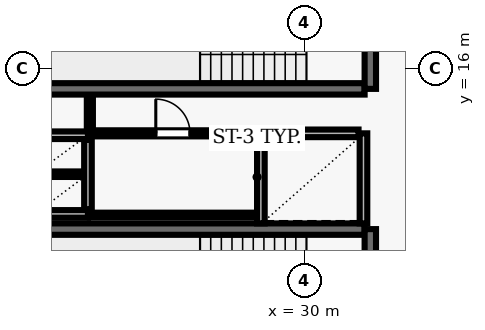
"""IFC4 building model, lengths in metres.
Left out: names, types, materials, properties, quantities, classifications, styles, units other than length and angle.
Written with IfcOpenShell. Run it as: python <this file> out.ifc"""

import sys

from ifc_helpers import new_model, si_unit, direction, frame, frame_2d, origin, place, context, subcontext, project, spatial, rectangle, extrude, element, fill, save


model = new_model("IFC4")
c1 = context("Model", 3, precision=1e-05, world=origin(), true_north=direction((0.0, 1.0)))
c2 = subcontext(c1, "Body", "Model", "MODEL_VIEW")
j1 = project(units=[si_unit("LENGTHUNIT", "METRE"), si_unit("PLANEANGLEUNIT", "RADIAN")], contexts=[c1])
p1 = place(None, origin())
s1 = spatial("IfcSite", under=j1, at=p1, CompositionType="ELEMENT")
p2 = place(p1, origin())
s2 = spatial("IfcBuilding", under=s1, at=p2, CompositionType="ELEMENT")
p3 = place(p2, frame((0.0, 0.0, 58.3)))
s3 = spatial("IfcBuildingStorey", under=s2, at=p3, CompositionType="ELEMENT", Elevation=58.3)
p4 = place(p3, frame((23.22, 15.47, 0.0), z_axis=(0.0, 0.0, 1.0), x_axis=(1.0, 0.0, 0.0)))
e1 = element("IfcWall", 1, at=p4, inside=s3, PredefinedType="SHEAR", context=c2, shape_type="SweptSolid", body=[
    extrude(rectangle(XDim=8.36, YDim=0.3, at=frame_2d((4.18, 0.0))), origin(), (0.0, 0.0, 1.0), 3.69),
])
p5 = place(p3, frame((31.73, 15.47, 0.0), z_axis=(0.0, 0.0, 1.0), x_axis=(0.0, 1.0, 0.0)))
e2 = element("IfcWall", 2, at=p5, inside=s3, PredefinedType="SHEAR", context=c2, shape_type="SweptSolid", body=[
    extrude(rectangle(XDim=3.51, YDim=0.3, at=frame_2d((1.755, 0.0))), origin(), (0.0, 0.0, 1.0), 3.69),
])
p6 = place(p5, frame((1.18, 0.0, 0.0)))
e3 = element("IfcOpeningElement", 3, at=p6, cuts=e2, PredefinedType="OPENING", context=c2, shape_type="SweptSolid", body=[
    extrude(rectangle(XDim=1.15, YDim=2.15, at=frame_2d((0.575, 1.075))), frame((0.0, 0.16, 0.0), z_axis=(0.0, -1.0, 0.0), x_axis=(1.0, 0.0, 0.0)), (0.0, 0.0, 1.0), 0.32),
])
p7 = place(p3, frame((31.58, 11.78, 0.0), z_axis=(0.0, 0.0, 1.0), x_axis=(-1.0, 0.0, 0.0)))
e4 = element("IfcWall", 4, at=p7, inside=s3, PredefinedType="SHEAR", context=c2, shape_type="SweptSolid", body=[
    extrude(rectangle(XDim=8.36, YDim=0.3, at=frame_2d((4.18, 0.0))), origin(), (0.0, 0.0, 1.0), 3.69),
])
p8 = place(p3, frame((31.73, 8.27, 0.0), z_axis=(0.0, 0.0, 1.0), x_axis=(0.0, 1.0, 0.0)))
e5 = element("IfcWall", 5, at=p8, inside=s3, PredefinedType="SHEAR", context=c2, shape_type="SweptSolid", body=[
    extrude(rectangle(XDim=3.51, YDim=0.3, at=frame_2d((1.755, 0.0))), origin(), (0.0, 0.0, 1.0), 3.69),
])
p9 = place(p8, frame((1.18, 0.0, 0.0)))
e6 = element("IfcOpeningElement", 6, at=p9, cuts=e5, PredefinedType="OPENING", context=c2, shape_type="SweptSolid", body=[
    extrude(rectangle(XDim=1.15, YDim=2.15, at=frame_2d((0.575, 1.075))), frame((0.0, 0.16, 0.0), z_axis=(0.0, -1.0, 0.0), x_axis=(1.0, 0.0, 0.0)), (0.0, 0.0, 1.0), 0.32),
])
for number, where, z_axis, x_axis in (
    (7, (28.85, 14.3, 0.0), (0.0, 0.0, 1.0), (0.0, -1.0, 0.0)),
    (8, (31.55, 11.93, 0.0), (0.0, 0.0, 1.0), (0.0, 1.0, 0.0)),
):
    element("IfcWall", number, at=place(p3, frame(where, z_axis=z_axis, x_axis=x_axis)), inside=s3, PredefinedType="SOLIDWALL", context=c2, shape_type="SweptSolid", body=[
        extrude(rectangle(XDim=2.37, YDim=0.2, at=frame_2d((1.185, 0.0))), origin(), (0.0, 0.0, 1.0), 3.69),
    ])
p10 = place(p3, frame((31.42, 14.3, 0.0), z_axis=(0.0, 0.0, 1.0), x_axis=(-1.0, 0.0, 0.0)))
e9 = element("IfcWall", 9, at=p10, inside=s3, PredefinedType="SOLIDWALL", context=c2, shape_type="SweptSolid", body=[
    extrude(rectangle(XDim=2.44, YDim=0.2, at=frame_2d((1.22, 0.0))), origin(), (0.0, 0.0, 1.0), 3.69),
])
for number, where, z_axis, x_axis in (
    (10, (22.9, 14.25, 0.0), (0.0, 0.0, 1.0), (1.0, 0.0, 0.0)),
    (11, (22.9, 12.18, 0.0), (0.0, 0.0, 1.0), (1.0, 0.0, 0.0)),
):
    element("IfcWall", number, at=place(p3, frame(where, z_axis=z_axis, x_axis=x_axis)), inside=s3, PredefinedType="SOLIDWALL", context=c2, shape_type="SweptSolid", body=[
        extrude(rectangle(XDim=1.4, YDim=0.2, at=frame_2d((0.7, 0.0))), origin(), (0.0, 0.0, 1.0), 3.69),
    ])
p11 = place(p3, frame((24.3, 12.3, 0.0), z_axis=(0.0, 0.0, 1.0), x_axis=(0.0, 1.0, 0.0)))
e12 = element("IfcWall", 12, at=p11, inside=s3, PredefinedType="SOLIDWALL", context=c2, shape_type="SweptSolid", body=[
    extrude(rectangle(XDim=1.83, YDim=0.2, at=frame_2d((0.915, 0.0))), origin(), (0.0, 0.0, 1.0), 3.69),
])
p12 = place(p3, frame((23.01, 13.225, 0.0), z_axis=(0.0, 0.0, 1.0), x_axis=(1.0, 0.0, 0.0)))
e13 = element("IfcWall", 13, at=p12, inside=s3, PredefinedType="PARTITIONING", context=c2, shape_type="SweptSolid", body=[
    extrude(rectangle(XDim=1.18, YDim=0.145, at=frame_2d((0.59, 0.0))), origin(), (0.0, 0.0, 1.0), 3.69),
])
p13 = place(p3, frame((24.35, 12.15, 0.0), z_axis=(0.0, 0.0, 1.0), x_axis=(1.0, 0.0, 0.0)))
e14 = element("IfcWall", 14, at=p13, inside=s3, PredefinedType="PARTITIONING", context=c2, shape_type="SweptSolid", body=[
    extrude(rectangle(XDim=4.37, YDim=0.125, at=frame_2d((2.185, 0.0))), origin(), (0.0, 0.0, 1.0), 3.69),
])
p14 = place(p3, frame((24.35, 14.3, 0.0), z_axis=(0.0, 0.0, 1.0), x_axis=(1.0, 0.0, 0.0)))
e15 = element("IfcWall", 15, at=p14, inside=s3, PredefinedType="PARTITIONING", context=c2, shape_type="SweptSolid", body=[
    extrude(rectangle(XDim=4.37, YDim=0.16, at=frame_2d((2.185, 0.0))), origin(), (0.0, 0.0, 1.0), 3.69),
])
p15 = place(p14, frame((1.735, 0.0, 0.0)))
e16 = element("IfcOpeningElement", 16, at=p15, cuts=e15, PredefinedType="OPENING", context=c2, shape_type="SweptSolid", body=[
    extrude(rectangle(XDim=0.9, YDim=2.1, at=frame_2d((0.45, 1.05))), frame((0.0, 0.09, 0.0), z_axis=(0.0, -1.0, 0.0), x_axis=(1.0, 0.0, 0.0)), (0.0, 0.0, 1.0), 0.18),
])
p16 = place(p3, frame((24.35, 15.29, 0.0), z_axis=(0.0, 0.0, 1.0), x_axis=(0.0, -1.0, 0.0)))
e17 = element("IfcWall", 17, at=p16, inside=s3, PredefinedType="PARTITIONING", context=c2, shape_type="SweptSolid", body=[
    extrude(rectangle(XDim=0.915, YDim=0.16, at=frame_2d((0.458, 0.0))), origin(), (0.0, 0.0, 1.0), 3.69),
])
p17 = place(p15, origin())
e18 = element("IfcDoor", 18, at=p17, inside=s3, OperationType="SINGLE_SWING_LEFT", PredefinedType="DOOR", context=c2, shape_type="SweptSolid", body=[
    extrude(rectangle(XDim=0.9, YDim=2.1, at=frame_2d((0.45, 1.05))), frame((0.0, 0.025, 0.0), z_axis=(0.0, -1.0, 0.0), x_axis=(1.0, 0.0, 0.0)), (0.0, 0.0, 1.0), 0.05),
])
fill(e16, e18)
save(model, sys.argv[1])
